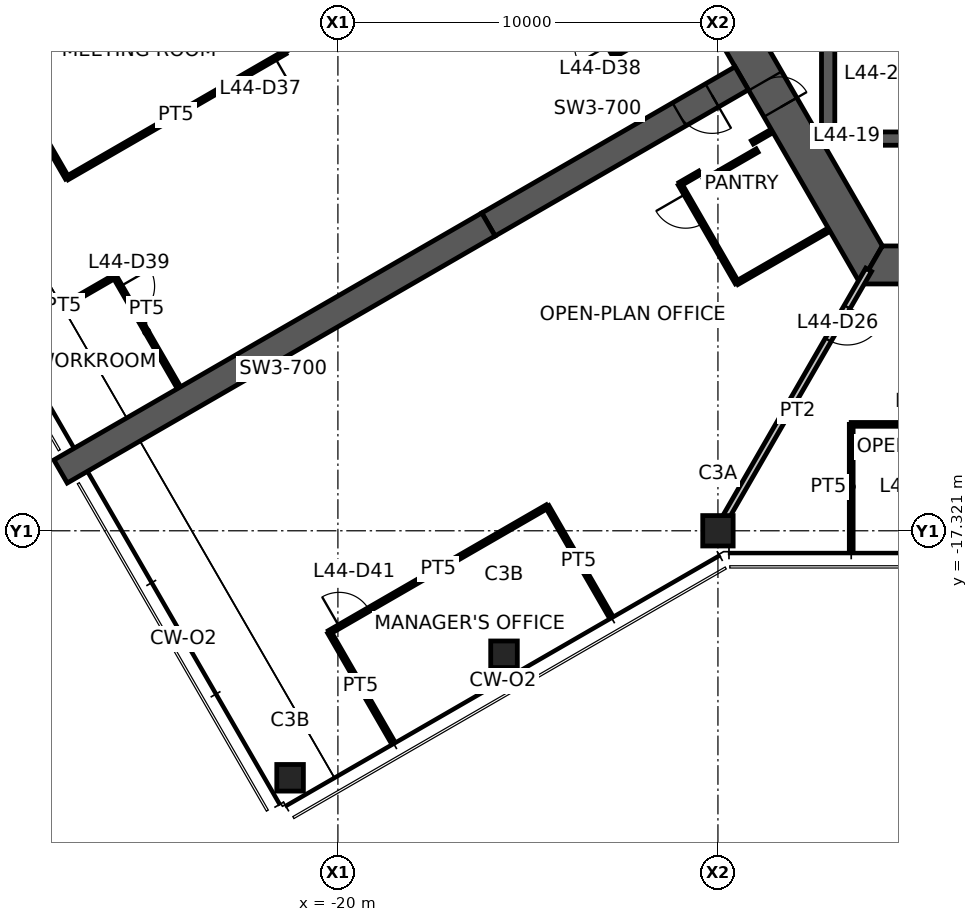
"""IFC4 building model, lengths in metres.
Left out: names, types, materials, properties, quantities, classifications, styles, units other than length and angle.
Written with IfcOpenShell. Run it as: python <this file> out.ifc"""

import sys

from ifc_helpers import new_model, si_unit, direction, frame, frame_2d, origin, origin_2d, place, context, subcontext, project, spatial, polyline, rectangle, hollow_rectangle, outline, extrude, element, fill, save


model = new_model("IFC4")
c1 = context("Model", 3, precision=1e-05, world=origin(), true_north=direction((0.0, 1.0)))
c2 = subcontext(c1, "Body", "Model", "MODEL_VIEW")
j1 = project(units=[si_unit("LENGTHUNIT", "METRE"), si_unit("PLANEANGLEUNIT", "RADIAN")], contexts=[c1])
p1 = place(None, origin())
s1 = spatial("IfcSite", under=j1, at=p1, CompositionType="ELEMENT")
p2 = place(p1, origin())
s2 = spatial("IfcBuilding", under=s1, at=p2, CompositionType="ELEMENT")
p3 = place(p2, frame((0.0, 0.0, 176.0)))
s3 = spatial("IfcBuildingStorey", under=s2, at=p3, CompositionType="ELEMENT", Elevation=176.0)
p4 = place(p3, frame((-10.0, -17.321, 0.0), z_axis=(0.0, 0.0, 1.0), x_axis=(1.0, 0.0, 0.0)))
e1 = element("IfcColumn", 1, at=p4, inside=s3, PredefinedType="COLUMN", context=c2, shape_type="SweptSolid", body=[
    extrude(hollow_rectangle(XDim=0.8, YDim=0.8, WallThickness=0.045, at=origin_2d()), origin(), (0.0, 0.0, 1.0), 3.9),
])
for number, where, z_axis, x_axis in (
    (2, (-15.629, -20.571, 0.0), (0.0, 0.0, 1.0), (1.0, 0.0, 0.0)),
    (3, (-21.258, -23.821, 0.0), (0.0, 0.0, 1.0), (1.0, 0.0, 0.0)),
):
    element("IfcColumn", number, at=place(p3, frame(where, z_axis=z_axis, x_axis=x_axis)), inside=s3, PredefinedType="COLUMN", context=c2, shape_type="SweptSolid", body=[
        extrude(hollow_rectangle(XDim=0.7, YDim=0.7, WallThickness=0.036, at=origin_2d()), origin(), (0.0, 0.0, 1.0), 3.9),
    ])
p5 = place(p3, frame((-11.922, 0.0, 0.0), z_axis=(0.0, 0.0, 1.0), x_axis=(0.500004296715, -0.866022923061, 0.0)))
e4 = element("IfcWall", 4, at=p5, inside=s3, PredefinedType="SHEAR", context=c2, shape_type="SweptSolid", body=[
    extrude(outline(polyline([(-0.289, -0.5), (6.331, -0.5), (7.131, -0.5), (12.211, -0.5), (11.634, 0.5), (7.131, 0.5), (6.331, 0.5), (0.289, 0.5), (-0.289, -0.5)])), origin(), (0.0, 0.0, 1.0), 3.9),
])
p6 = place(p5, frame((6.331, 0.0, 0.0)))
e5 = element("IfcOpeningElement", 5, at=p6, cuts=e4, PredefinedType="OPENING", context=c2, shape_type="SweptSolid", body=[
    extrude(rectangle(XDim=0.8, YDim=2.1, at=frame_2d((0.4, 1.05))), frame((0.0, 0.51, 0.0), z_axis=(0.0, -1.0, 0.0), x_axis=(1.0, 0.0, 0.0)), (0.0, 0.0, 1.0), 1.02),
])
p7 = place(p3, frame((-5.961, -10.325, 0.0), z_axis=(0.0, 0.0, 1.0), x_axis=(1.0, 0.0, 0.0)))
e6 = element("IfcWall", 6, at=p7, inside=s3, PredefinedType="SHEAR", context=c2, shape_type="SweptSolid", body=[
    extrude(outline(polyline([(-0.289, -0.5), (5.461, -0.5), (6.461, -0.5), (12.211, -0.5), (11.634, 0.5), (6.461, 0.5), (5.461, 0.5), (0.289, 0.5), (-0.289, -0.5)])), origin(), (0.0, 0.0, 1.0), 3.9),
])
p8 = place(p7, frame((5.461, 0.0, 0.0)))
e7 = element("IfcOpeningElement", 7, at=p8, cuts=e6, PredefinedType="OPENING", context=c2, shape_type="SweptSolid", body=[
    extrude(rectangle(XDim=1.0, YDim=2.1, at=frame_2d((0.5, 1.05))), frame((0.0, 0.51, 0.0), z_axis=(0.0, -1.0, 0.0), x_axis=(1.0, 0.0, 0.0)), (0.0, 0.0, 1.0), 1.02),
])
p9 = place(p3, frame((-9.375, -5.413, 0.0), z_axis=(0.0, 0.0, 1.0), x_axis=(-0.866032377459, -0.499987921047, 0.0)))
e8 = element("IfcWall", 8, at=p9, inside=s3, PredefinedType="SHEAR", context=c2, shape_type="SweptSolid", body=[
    extrude(rectangle(XDim=7.696, YDim=0.7, at=frame_2d((3.848, 0.0))), origin(), (0.0, 0.0, 1.0), 3.9),
])
p10 = place(p9, frame((0.9, 0.0, 0.0)))
e9 = element("IfcOpeningElement", 9, at=p10, cuts=e8, PredefinedType="OPENING", context=c2, shape_type="SweptSolid", body=[
    extrude(rectangle(XDim=1.0, YDim=2.1, at=frame_2d((0.5, 1.05))), frame((0.0, 0.36, 0.0), z_axis=(0.0, -1.0, 0.0), x_axis=(1.0, 0.0, 0.0)), (0.0, 0.0, 1.0), 0.72),
])
p11 = place(p3, frame((-16.039, -9.26, 0.0), z_axis=(0.0, 0.0, 1.0), x_axis=(-0.866024837091, -0.50000098154, 0.0)))
e10 = element("IfcWall", 10, at=p11, inside=s3, PredefinedType="SHEAR", context=c2, shape_type="SweptSolid", body=[
    extrude(rectangle(XDim=13.0, YDim=0.7, at=frame_2d((6.5, 0.0))), origin(), (0.0, 0.0, 1.0), 3.9),
])
p12 = place(p3, frame((-6.925, -7.0, 0.0), z_axis=(0.0, 0.0, 1.0), x_axis=(1.0, 0.0, 0.0)))
e11 = element("IfcWall", 11, at=p12, inside=s3, PredefinedType="SHEAR", context=c2, shape_type="SweptSolid", body=[
    extrude(rectangle(XDim=2.25, YDim=0.35, at=frame_2d((1.125, 0.0))), origin(), (0.0, 0.0, 1.0), 3.9),
])
p13 = place(p3, frame((-7.1, -3.775, 0.0), z_axis=(0.0, 0.0, 1.0), x_axis=(0.0, -1.0, 0.0)))
e12 = element("IfcWall", 12, at=p13, inside=s3, PredefinedType="SHEAR", context=c2, shape_type="SweptSolid", body=[
    extrude(outline(polyline([(0.0, -0.175), (3.274, -0.175), (3.4, 0.0), (3.4, 0.175), (0.0, 0.175), (0.0, -0.175)])), origin(), (0.0, 0.0, 1.0), 3.9),
])
p14 = place(p3, frame((-6.035, -10.453, 0.0), z_axis=(0.0, 0.0, 1.0), x_axis=(-0.499989830942, -0.866031274813, 0.0)))
e13 = element("IfcWall", 13, at=p14, inside=s3, PredefinedType="PARTITIONING", context=c2, shape_type="SweptSolid", body=[
    extrude(rectangle(XDim=7.93, YDim=0.175, at=frame_2d((3.965, 0.0))), origin(), (0.0, 0.0, 1.0), 3.05),
])
p15 = place(p14, frame((1.13, 0.0, 0.0)))
e14 = element("IfcOpeningElement", 14, at=p15, cuts=e13, PredefinedType="OPENING", context=c2, shape_type="SweptSolid", body=[
    extrude(rectangle(XDim=1.0, YDim=2.1, at=frame_2d((0.5, 1.05))), frame((0.0, 0.098, 0.0), z_axis=(0.0, -1.0, 0.0), x_axis=(1.0, 0.0, 0.0)), (0.0, 0.0, 1.0), 0.195),
])
p16 = place(p3, frame((-27.125, -8.04, 0.0), z_axis=(0.0, 0.0, 1.0), x_axis=(-0.499978621081, 0.866037746557, 0.0)))
e15 = element("IfcWall", 15, at=p16, inside=s3, PredefinedType="PARTITIONING", context=c2, shape_type="SweptSolid", body=[
    extrude(rectangle(XDim=3.905, YDim=0.1, at=frame_2d((1.953, 0.0))), origin(), (0.0, 0.0, 1.0), 2.95),
])
p17 = place(p3, frame((-23.332, -1.37, 0.0), z_axis=(0.0, 0.0, 1.0), x_axis=(0.500043804875, -0.866000111551, 0.0)))
e16 = element("IfcWall", 16, at=p17, inside=s3, PredefinedType="PARTITIONING", context=c2, shape_type="SweptSolid", body=[
    extrude(rectangle(XDim=3.88, YDim=0.1, at=frame_2d((1.94, 0.0))), origin(), (0.0, 0.0, 1.0), 2.95),
])
p18 = place(p3, frame((-21.392, -4.73, 0.0), z_axis=(0.0, 0.0, 1.0), x_axis=(-0.866030817826, -0.499990622488, 0.0)))
e17 = element("IfcWall", 17, at=p18, inside=s3, PredefinedType="PARTITIONING", context=c2, shape_type="SweptSolid", body=[
    extrude(rectangle(XDim=6.62, YDim=0.1, at=frame_2d((3.31, 0.0))), origin(), (0.0, 0.0, 1.0), 2.95),
])
p19 = place(p18, frame((0.3, 0.0, 0.0)))
e18 = element("IfcOpeningElement", 18, at=p19, cuts=e17, PredefinedType="OPENING", context=c2, shape_type="SweptSolid", body=[
    extrude(rectangle(XDim=0.9, YDim=2.1, at=frame_2d((0.45, 1.05))), frame((0.0, 0.06, 0.0), z_axis=(0.0, -1.0, 0.0), x_axis=(1.0, 0.0, 0.0)), (0.0, 0.0, 1.0), 0.12),
])
p20 = place(p3, frame((-12.726, -4.807, 0.0), z_axis=(0.0, 0.0, 1.0), x_axis=(-0.500062241894, 0.865989465428, 0.0)))
e19 = element("IfcWall", 19, at=p20, inside=s3, PredefinedType="PARTITIONING", context=c2, shape_type="SweptSolid", body=[
    extrude(rectangle(XDim=3.4, YDim=0.1, at=frame_2d((1.7, 0.0))), origin(), (0.0, 0.0, 1.0), 2.95),
])
p21 = place(p20, frame((0.3, 0.0, 0.0)))
e20 = element("IfcOpeningElement", 20, at=p21, cuts=e19, PredefinedType="OPENING", context=c2, shape_type="SweptSolid", body=[
    extrude(rectangle(XDim=0.9, YDim=2.1, at=frame_2d((0.45, 1.05))), frame((0.0, 0.06, 0.0), z_axis=(0.0, -1.0, 0.0), x_axis=(1.0, 0.0, 0.0)), (0.0, 0.0, 1.0), 0.12),
])
p22 = place(p3, frame((-10.492, -3.517, 0.0), z_axis=(0.0, 0.0, 1.0), x_axis=(-0.866021702275, -0.500006411147, 0.0)))
e21 = element("IfcWall", 21, at=p22, inside=s3, PredefinedType="PARTITIONING", context=c2, shape_type="SweptSolid", body=[
    extrude(rectangle(XDim=2.58, YDim=0.1, at=frame_2d((1.29, 0.0))), origin(), (0.0, 0.0, 1.0), 2.95),
])
p23 = place(p3, frame((-28.562, -12.18, 0.0), z_axis=(0.0, 0.0, 1.0), x_axis=(0.866042875753, 0.499969736442, 0.0)))
e22 = element("IfcWall", 22, at=p23, inside=s3, PredefinedType="PARTITIONING", context=c2, shape_type="SweptSolid", body=[
    extrude(rectangle(XDim=3.105, YDim=0.1, at=frame_2d((1.553, 0.0))), origin(), (0.0, 0.0, 1.0), 2.95),
])
p24 = place(p3, frame((-25.873, -10.627, 0.0), z_axis=(0.0, 0.0, 1.0), x_axis=(0.5000115033, -0.866018762249, 0.0)))
e23 = element("IfcWall", 23, at=p24, inside=s3, PredefinedType="PARTITIONING", context=c2, shape_type="SweptSolid", body=[
    extrude(rectangle(XDim=3.363, YDim=0.1, at=frame_2d((1.682, 0.0))), origin(), (0.0, 0.0, 1.0), 2.95),
])
p25 = place(p24, frame((0.3, 0.0, 0.0)))
e24 = element("IfcOpeningElement", 24, at=p25, cuts=e23, PredefinedType="OPENING", context=c2, shape_type="SweptSolid", body=[
    extrude(rectangle(XDim=0.9, YDim=2.1, at=frame_2d((0.45, 1.05))), frame((0.0, 0.06, 0.0), z_axis=(0.0, -1.0, 0.0), x_axis=(1.0, 0.0, 0.0)), (0.0, 0.0, 1.0), 0.12),
])
p26 = place(p3, frame((-11.0, -8.198, 0.0), z_axis=(0.0, 0.0, 1.0), x_axis=(0.866131372301, 0.499816412211, 0.0)))
e25 = element("IfcWall", 25, at=p26, inside=s3, PredefinedType="PARTITIONING", context=c2, shape_type="SweptSolid", body=[
    extrude(rectangle(XDim=0.6, YDim=0.1, at=frame_2d((0.3, 0.0))), origin(), (0.0, 0.0, 1.0), 2.95),
])
p27 = place(p3, frame((-10.355, -8.115, 0.0), z_axis=(0.0, 0.0, 1.0), x_axis=(0.866094119867, 0.499880961361, 0.0)))
e26 = element("IfcWall", 26, at=p27, inside=s3, PredefinedType="PARTITIONING", context=c2, shape_type="SweptSolid", body=[
    extrude(rectangle(XDim=1.6, YDim=0.1, at=frame_2d((0.8, 0.0))), origin(), (0.0, 0.0, 1.0), 2.95),
])
p28 = place(p3, frame((-9.5, -10.796, 0.0), z_axis=(0.0, 0.0, 1.0), x_axis=(-0.499990139034, 0.866031096941, 0.0)))
e27 = element("IfcWall", 27, at=p28, inside=s3, PredefinedType="PARTITIONING", context=c2, shape_type="SweptSolid", body=[
    extrude(rectangle(XDim=3.0, YDim=0.1, at=frame_2d((1.5, 0.0))), origin(), (0.0, 0.0, 1.0), 2.95),
])
p29 = place(p28, frame((1.8, 0.0, 0.0)))
e28 = element("IfcOpeningElement", 28, at=p29, cuts=e27, PredefinedType="OPENING", context=c2, shape_type="SweptSolid", body=[
    extrude(rectangle(XDim=0.9, YDim=2.1, at=frame_2d((0.45, 1.05))), frame((0.0, 0.06, 0.0), z_axis=(0.0, -1.0, 0.0), x_axis=(1.0, 0.0, 0.0)), (0.0, 0.0, 1.0), 0.12),
])
p30 = place(p3, frame((-9.094, -7.098, 0.0), z_axis=(0.0, 0.0, 1.0), x_axis=(0.865954211699, 0.50012328804, 0.0)))
e29 = element("IfcWall", 29, at=p30, inside=s3, PredefinedType="PARTITIONING", context=c2, shape_type="SweptSolid", body=[
    extrude(rectangle(XDim=0.58, YDim=0.1, at=frame_2d((0.29, 0.0))), origin(), (0.0, 0.0, 1.0), 2.95),
])
p31 = place(p3, frame((-7.092, -9.406, 0.0), z_axis=(0.0, 0.0, 1.0), x_axis=(-0.86603494908, -0.499983466698, 0.0)))
e30 = element("IfcWall", 30, at=p31, inside=s3, PredefinedType="PARTITIONING", context=c2, shape_type="SweptSolid", body=[
    extrude(rectangle(XDim=2.78, YDim=0.1, at=frame_2d((1.39, 0.0))), origin(), (0.0, 0.0, 1.0), 2.95),
])
p32 = place(p3, frame((-20.225, -19.991, 0.0), z_axis=(0.0, 0.0, 1.0), x_axis=(0.866030817826, 0.499990622488, 0.0)))
e31 = element("IfcWall", 31, at=p32, inside=s3, PredefinedType="PARTITIONING", context=c2, shape_type="SweptSolid", body=[
    extrude(rectangle(XDim=6.62, YDim=0.1, at=frame_2d((3.31, 0.0))), origin(), (0.0, 0.0, 1.0), 2.95),
])
p33 = place(p32, frame((0.3, 0.0, 0.0)))
e32 = element("IfcOpeningElement", 32, at=p33, cuts=e31, PredefinedType="OPENING", context=c2, shape_type="SweptSolid", body=[
    extrude(rectangle(XDim=0.9, YDim=2.1, at=frame_2d((0.45, 1.05))), frame((0.0, 0.06, 0.0), z_axis=(0.0, -1.0, 0.0), x_axis=(1.0, 0.0, 0.0)), (0.0, 0.0, 1.0), 0.12),
])
p34 = place(p3, frame((-18.585, -22.831, 0.0), z_axis=(0.0, 0.0, 1.0), x_axis=(-0.50002956483, 0.866008333849, 0.0)))
e33 = element("IfcWall", 33, at=p34, inside=s3, PredefinedType="PARTITIONING", context=c2, shape_type="SweptSolid", body=[
    extrude(rectangle(XDim=3.28, YDim=0.1, at=frame_2d((1.64, 0.0))), origin(), (0.0, 0.0, 1.0), 2.95),
])
p35 = place(p3, frame((-14.492, -16.681, 0.0), z_axis=(0.0, 0.0, 1.0), x_axis=(0.500008057651, -0.866020751647, 0.0)))
e34 = element("IfcWall", 34, at=p35, inside=s3, PredefinedType="PARTITIONING", context=c2, shape_type="SweptSolid", body=[
    extrude(rectangle(XDim=3.305, YDim=0.1, at=frame_2d((1.653, 0.0))), origin(), (0.0, 0.0, 1.0), 2.95),
])
p36 = place(p3, frame((-6.493, -17.801, 0.0), z_axis=(0.0, 0.0, 1.0), x_axis=(0.0, 1.0, 0.0)))
e35 = element("IfcWall", 35, at=p36, inside=s3, PredefinedType="PARTITIONING", context=c2, shape_type="SweptSolid", body=[
    extrude(rectangle(XDim=3.28, YDim=0.1, at=frame_2d((1.64, 0.0))), origin(), (0.0, 0.0, 1.0), 2.95),
])
p37 = place(p3, frame((-6.493, -14.521, 0.0), z_axis=(0.0, 0.0, 1.0), x_axis=(1.0, 0.0, 0.0)))
e36 = element("IfcWall", 36, at=p37, inside=s3, PredefinedType="PARTITIONING", context=c2, shape_type="SweptSolid", body=[
    extrude(rectangle(XDim=3.247, YDim=0.1, at=frame_2d((1.623, 0.0))), origin(), (0.0, 0.0, 1.0), 2.95),
])
p38 = place(p6, origin())
e37 = element("IfcDoor", 37, at=p38, inside=s3, OperationType="SINGLE_SWING_RIGHT", PredefinedType="DOOR", context=c2, shape_type="SweptSolid", body=[
    extrude(rectangle(XDim=0.8, YDim=2.1, at=frame_2d((0.4, 1.05))), frame((0.0, 0.025, 0.0), z_axis=(0.0, -1.0, 0.0), x_axis=(1.0, 0.0, 0.0)), (0.0, 0.0, 1.0), 0.05),
])
fill(e5, e37)
p39 = place(p10, origin())
e38 = element("IfcDoor", 38, at=p39, inside=s3, OperationType="SINGLE_SWING_LEFT", PredefinedType="DOOR", context=c2, shape_type="SweptSolid", body=[
    extrude(rectangle(XDim=1.0, YDim=2.1, at=frame_2d((0.5, 1.05))), frame((0.0, 0.025, 0.0), z_axis=(0.0, -1.0, 0.0), x_axis=(1.0, 0.0, 0.0)), (0.0, 0.0, 1.0), 0.05),
])
fill(e9, e38)
p40 = place(p15, origin())
e39 = element("IfcDoor", 39, at=p40, inside=s3, OperationType="SINGLE_SWING_LEFT", PredefinedType="DOOR", context=c2, shape_type="SweptSolid", body=[
    extrude(rectangle(XDim=1.0, YDim=2.1, at=frame_2d((0.5, 1.05))), frame((0.0, 0.025, 0.0), z_axis=(0.0, -1.0, 0.0), x_axis=(1.0, 0.0, 0.0)), (0.0, 0.0, 1.0), 0.05),
])
fill(e14, e39)
p41 = place(p19, origin())
e40 = element("IfcDoor", 40, at=p41, inside=s3, OperationType="SINGLE_SWING_LEFT", PredefinedType="DOOR", context=c2, shape_type="SweptSolid", body=[
    extrude(rectangle(XDim=0.9, YDim=2.1, at=frame_2d((0.45, 1.05))), frame((0.0, 0.025, 0.0), z_axis=(0.0, -1.0, 0.0), x_axis=(1.0, 0.0, 0.0)), (0.0, 0.0, 1.0), 0.05),
])
fill(e18, e40)
p42 = place(p25, origin())
e41 = element("IfcDoor", 41, at=p42, inside=s3, OperationType="SINGLE_SWING_LEFT", PredefinedType="DOOR", context=c2, shape_type="SweptSolid", body=[
    extrude(rectangle(XDim=0.9, YDim=2.1, at=frame_2d((0.45, 1.05))), frame((0.0, 0.025, 0.0), z_axis=(0.0, -1.0, 0.0), x_axis=(1.0, 0.0, 0.0)), (0.0, 0.0, 1.0), 0.05),
])
fill(e24, e41)
p43 = place(p29, origin())
e42 = element("IfcDoor", 42, at=p43, inside=s3, OperationType="SINGLE_SWING_RIGHT", PredefinedType="DOOR", context=c2, shape_type="SweptSolid", body=[
    extrude(rectangle(XDim=0.9, YDim=2.1, at=frame_2d((0.45, 1.05))), frame((0.0, 0.025, 0.0), z_axis=(0.0, -1.0, 0.0), x_axis=(1.0, 0.0, 0.0)), (0.0, 0.0, 1.0), 0.05),
])
fill(e28, e42)
p44 = place(p33, origin())
e43 = element("IfcDoor", 43, at=p44, inside=s3, OperationType="SINGLE_SWING_LEFT", PredefinedType="DOOR", context=c2, shape_type="SweptSolid", body=[
    extrude(rectangle(XDim=0.9, YDim=2.1, at=frame_2d((0.45, 1.05))), frame((0.0, 0.025, 0.0), z_axis=(0.0, -1.0, 0.0), x_axis=(1.0, 0.0, 0.0)), (0.0, 0.0, 1.0), 0.05),
])
fill(e32, e43)
save(model, sys.argv[1])
